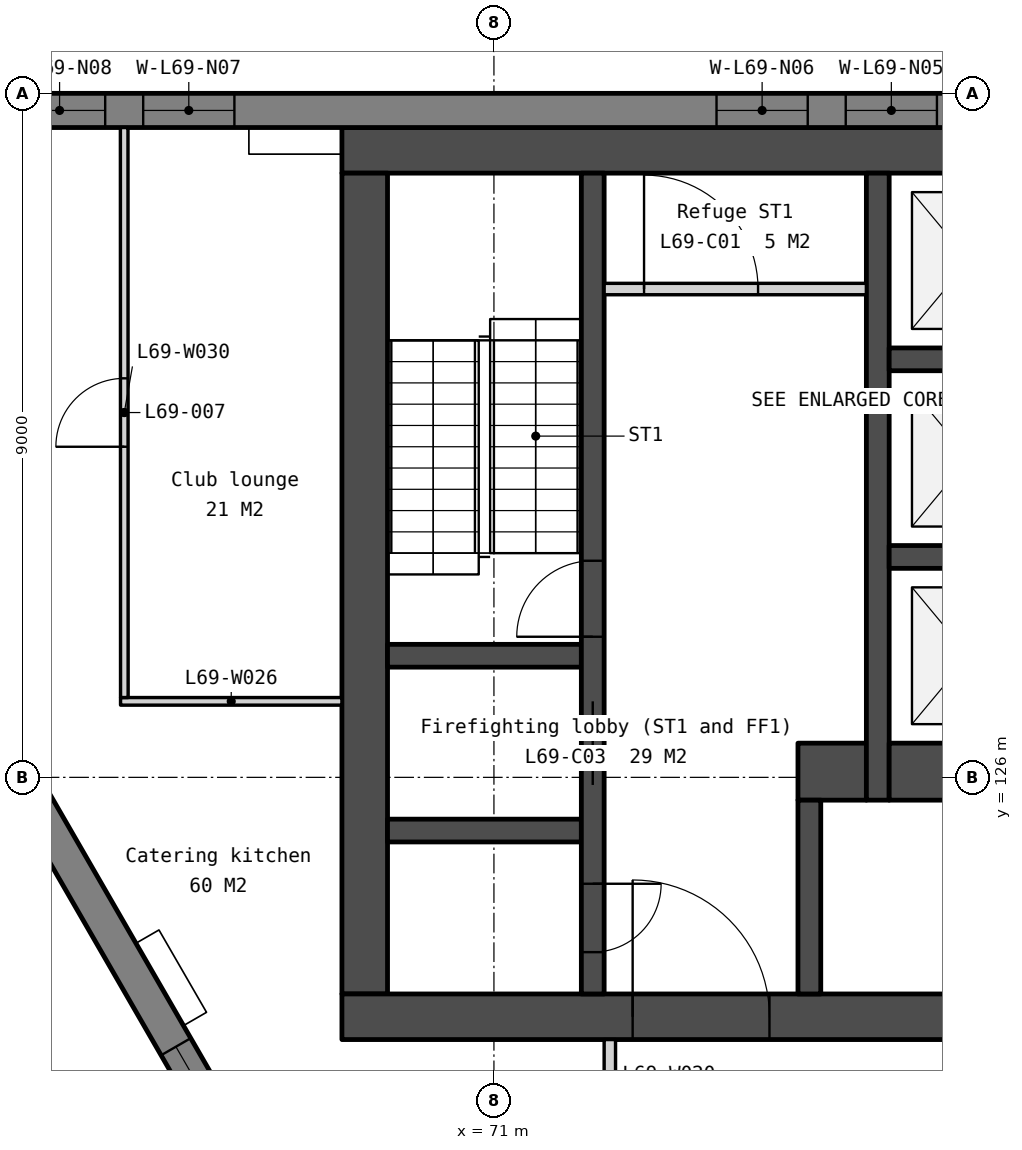
"""IFC4 building model, lengths in metres.
Left out: names, types, materials, properties, quantities, classifications, styles, units other than length and angle.
Written with IfcOpenShell. Run it as: python <this file> out.ifc"""

import sys

from ifc_helpers import new_model, si_unit, direction, frame, frame_2d, origin, place, context, subcontext, project, spatial, polyline, rectangle, outline, extrude, element, fill, save


model = new_model("IFC4")
c1 = context("Model", 3, precision=1e-05, world=origin(), true_north=direction((0.0, 1.0)))
c2 = subcontext(c1, "Body", "Model", "MODEL_VIEW")
j1 = project(units=[si_unit("LENGTHUNIT", "METRE"), si_unit("PLANEANGLEUNIT", "RADIAN")], contexts=[c1])
p1 = place(None, origin())
s1 = spatial("IfcSite", under=j1, at=p1, CompositionType="ELEMENT")
p2 = place(p1, origin())
s2 = spatial("IfcBuilding", under=s1, at=p2, CompositionType="ELEMENT")
p3 = place(p2, frame((0.0, 0.0, 281.6)))
s3 = spatial("IfcBuildingStorey", under=s2, at=p3, CompositionType="ELEMENT", Elevation=281.6)
p4 = place(p3, frame((69.0, 134.25, 0.0), z_axis=(0.0, 0.0, 1.0), x_axis=(1.0, 0.0, 0.0)))
e1 = element("IfcWall", 1, at=p4, inside=s3, PredefinedType="SOLIDWALL", context=c2, shape_type="SweptSolid", body=[
    extrude(rectangle(XDim=22.0, YDim=0.6, at=frame_2d((11.0, 0.0))), origin(), (0.0, 0.0, 1.0), 3.5),
])
p5 = place(p3, frame((69.3, 133.95, 0.0), z_axis=(0.0, 0.0, 1.0), x_axis=(0.0, -1.0, 0.0)))
e2 = element("IfcWall", 2, at=p5, inside=s3, PredefinedType="SOLIDWALL", context=c2, shape_type="SweptSolid", body=[
    extrude(rectangle(XDim=10.8, YDim=0.6, at=frame_2d((5.4, 0.0))), origin(), (0.0, 0.0, 1.0), 3.5),
])
p6 = place(p3, frame((69.0, 122.85, 0.0), z_axis=(0.0, 0.0, 1.0), x_axis=(1.0, 0.0, 0.0)))
e3 = element("IfcWall", 3, at=p6, inside=s3, PredefinedType="SOLIDWALL", context=c2, shape_type="SweptSolid", body=[
    extrude(rectangle(XDim=22.0, YDim=0.6, at=frame_2d((11.0, 0.0))), origin(), (0.0, 0.0, 1.0), 3.5),
])
p7 = place(p6, frame((16.375, 0.0, 0.0)))
e4 = element("IfcOpeningElement", 4, at=p7, cuts=e3, PredefinedType="OPENING", context=c2, shape_type="SweptSolid", body=[
    extrude(rectangle(XDim=1.8, YDim=2.1, at=frame_2d((0.9, 1.05))), frame((0.0, 0.31, 0.0), z_axis=(0.0, -1.0, 0.0), x_axis=(1.0, 0.0, 0.0)), (0.0, 0.0, 1.0), 0.62),
])
p8 = place(p6, frame((3.825, 0.0, 0.0)))
e5 = element("IfcOpeningElement", 5, at=p8, cuts=e3, PredefinedType="OPENING", context=c2, shape_type="SweptSolid", body=[
    extrude(rectangle(XDim=1.8, YDim=2.1, at=frame_2d((0.9, 1.05))), frame((0.0, 0.31, 0.0), z_axis=(0.0, -1.0, 0.0), x_axis=(1.0, 0.0, 0.0)), (0.0, 0.0, 1.0), 0.62),
])
p9 = place(p6, frame((12.85, 0.0, 0.0)))
e6 = element("IfcOpeningElement", 6, at=p9, cuts=e3, PredefinedType="OPENING", context=c2, shape_type="SweptSolid", body=[
    extrude(rectangle(XDim=1.5, YDim=2.1, at=frame_2d((0.75, 1.05))), frame((0.0, 0.31, 0.0), z_axis=(0.0, -1.0, 0.0), x_axis=(1.0, 0.0, 0.0)), (0.0, 0.0, 1.0), 0.62),
])
for number, where, z_axis, x_axis in (
    (7, (69.6, 127.6, 0.0), (0.0, 0.0, 1.0), (1.0, 0.0, 0.0)),
    (8, (69.6, 125.3, 0.0), (0.0, 0.0, 1.0), (1.0, 0.0, 0.0)),
):
    element("IfcWall", number, at=place(p3, frame(where, z_axis=z_axis, x_axis=x_axis)), inside=s3, PredefinedType="SOLIDWALL", context=c2, shape_type="SweptSolid", body=[
        extrude(rectangle(XDim=2.55, YDim=0.3, at=frame_2d((1.275, 0.0))), origin(), (0.0, 0.0, 1.0), 3.5),
    ])
p10 = place(p3, frame((72.3, 133.95, 0.0), z_axis=(0.0, 0.0, 1.0), x_axis=(0.0, -1.0, 0.0)))
e9 = element("IfcWall", 9, at=p10, inside=s3, PredefinedType="SOLIDWALL", context=c2, shape_type="SweptSolid", body=[
    extrude(rectangle(XDim=10.8, YDim=0.3, at=frame_2d((5.4, 0.0))), origin(), (0.0, 0.0, 1.0), 3.5),
])
p11 = place(p10, frame((6.95, 0.0, 0.0)))
e10 = element("IfcOpeningElement", 10, at=p11, cuts=e9, PredefinedType="OPENING", context=c2, shape_type="SweptSolid", body=[
    extrude(rectangle(XDim=1.1, YDim=2.1, at=frame_2d((0.55, 1.05))), frame((0.0, 0.16, 0.0), z_axis=(0.0, -1.0, 0.0), x_axis=(1.0, 0.0, 0.0)), (0.0, 0.0, 1.0), 0.32),
])
p12 = place(p10, frame((9.35, 0.0, 0.0)))
e11 = element("IfcOpeningElement", 11, at=p12, cuts=e9, PredefinedType="OPENING", context=c2, shape_type="SweptSolid", body=[
    extrude(rectangle(XDim=0.9, YDim=2.1, at=frame_2d((0.45, 1.05))), frame((0.0, 0.16, 0.0), z_axis=(0.0, -1.0, 0.0), x_axis=(1.0, 0.0, 0.0)), (0.0, 0.0, 1.0), 0.32),
])
p13 = place(p10, frame((5.1, 0.0, 0.0)))
e12 = element("IfcOpeningElement", 12, at=p13, cuts=e9, PredefinedType="OPENING", context=c2, shape_type="SweptSolid", body=[
    extrude(rectangle(XDim=1.0, YDim=2.1, at=frame_2d((0.5, 1.05))), frame((0.0, 0.16, 0.0), z_axis=(0.0, -1.0, 0.0), x_axis=(1.0, 0.0, 0.0)), (0.0, 0.0, 1.0), 0.32),
])
p14 = place(p3, frame((72.45, 132.425, 0.0), z_axis=(0.0, 0.0, 1.0), x_axis=(1.0, 0.0, 0.0)))
e13 = element("IfcWall", 13, at=p14, inside=s3, PredefinedType="PARTITIONING", context=c2, shape_type="SweptSolid", body=[
    extrude(rectangle(XDim=3.45, YDim=0.15, at=frame_2d((1.725, 0.0))), origin(), (0.0, 0.0, 1.0), 3.5),
])
p15 = place(p14, frame((0.525, 0.0, 0.0)))
e14 = element("IfcOpeningElement", 14, at=p15, cuts=e13, PredefinedType="OPENING", context=c2, shape_type="SweptSolid", body=[
    extrude(rectangle(XDim=1.5, YDim=2.1, at=frame_2d((0.75, 1.05))), frame((0.0, 0.085, 0.0), z_axis=(0.0, -1.0, 0.0), x_axis=(1.0, 0.0, 0.0)), (0.0, 0.0, 1.0), 0.17),
])
p16 = place(p3, frame((75.0, 126.075, 0.0), z_axis=(0.0, 0.0, 1.0), x_axis=(1.0, 0.0, 0.0)))
e15 = element("IfcWall", 15, at=p16, inside=s3, PredefinedType="SOLIDWALL", context=c2, shape_type="SweptSolid", body=[
    extrude(rectangle(XDim=0.9, YDim=0.75, at=frame_2d((0.45, 0.0))), origin(), (0.0, 0.0, 1.0), 3.5),
])
p17 = place(p3, frame((75.15, 125.7, 0.0), z_axis=(0.0, 0.0, 1.0), x_axis=(0.0, -1.0, 0.0)))
e16 = element("IfcWall", 16, at=p17, inside=s3, PredefinedType="SOLIDWALL", context=c2, shape_type="SweptSolid", body=[
    extrude(rectangle(XDim=2.55, YDim=0.3, at=frame_2d((1.275, 0.0))), origin(), (0.0, 0.0, 1.0), 3.5),
])
p18 = place(p3, frame((76.05, 133.95, 0.0), z_axis=(0.0, 0.0, 1.0), x_axis=(0.0, -1.0, 0.0)))
e17 = element("IfcWall", 17, at=p18, inside=s3, PredefinedType="SOLIDWALL", context=c2, shape_type="SweptSolid", body=[
    extrude(rectangle(XDim=8.25, YDim=0.3, at=frame_2d((4.125, 0.0))), origin(), (0.0, 0.0, 1.0), 3.5),
])
for number, where, z_axis, x_axis in (
    (18, (76.2, 131.5, 0.0), (0.0, 0.0, 1.0), (1.0, 0.0, 0.0)),
    (19, (76.2, 128.9, 0.0), (0.0, 0.0, 1.0), (1.0, 0.0, 0.0)),
):
    element("IfcWall", number, at=place(p3, frame(where, z_axis=z_axis, x_axis=x_axis)), inside=s3, PredefinedType="SOLIDWALL", context=c2, shape_type="SweptSolid", body=[
        extrude(rectangle(XDim=2.1, YDim=0.3, at=frame_2d((1.05, 0.0))), origin(), (0.0, 0.0, 1.0), 3.5),
    ])
p19 = place(p3, frame((76.2, 126.075, 0.0), z_axis=(0.0, 0.0, 1.0), x_axis=(1.0, 0.0, 0.0)))
e20 = element("IfcWall", 20, at=p19, inside=s3, PredefinedType="SOLIDWALL", context=c2, shape_type="SweptSolid", body=[
    extrude(rectangle(XDim=2.1, YDim=0.75, at=frame_2d((1.05, 0.0))), origin(), (0.0, 0.0, 1.0), 3.5),
])
p20 = place(p3, frame((98.486, 134.775, -0.15), z_axis=(0.0, 0.0, 1.0), x_axis=(-1.0, 0.0, 0.0)))
e21 = element("IfcWall", 21, at=p20, inside=s3, PredefinedType="SOLIDWALL", context=c2, shape_type="SweptSolid", body=[
    extrude(outline(polyline([(36.972, 0.0), (36.972, 3.55), (0.0, 3.55), (0.0, 0.0), (36.972, 0.0)])), frame((0.0, 0.225, 0.0), z_axis=(0.0, -1.0, 0.0), x_axis=(1.0, 0.0, 0.0)), (0.0, 0.0, 1.0), 0.45),
])
p21 = place(p20, frame((3.172, 0.0, 0.95)))
e22 = element("IfcOpeningElement", 22, at=p21, cuts=e21, PredefinedType="OPENING", context=c2, shape_type="SweptSolid", body=[
    extrude(rectangle(XDim=1.2, YDim=2.2, at=frame_2d((0.6, 1.1))), frame((0.0, 0.235, 0.0), z_axis=(0.0, -1.0, 0.0), x_axis=(1.0, 0.0, 0.0)), (0.0, 0.0, 1.0), 0.47),
])
p22 = place(p20, frame((4.872, 0.0, 0.95)))
e23 = element("IfcOpeningElement", 23, at=p22, cuts=e21, PredefinedType="OPENING", context=c2, shape_type="SweptSolid", body=[
    extrude(rectangle(XDim=1.2, YDim=2.2, at=frame_2d((0.6, 1.1))), frame((0.0, 0.235, 0.0), z_axis=(0.0, -1.0, 0.0), x_axis=(1.0, 0.0, 0.0)), (0.0, 0.0, 1.0), 0.47),
])
p23 = place(p20, frame((12.415, 0.0, 0.95)))
e24 = element("IfcOpeningElement", 24, at=p23, cuts=e21, PredefinedType="OPENING", context=c2, shape_type="SweptSolid", body=[
    extrude(rectangle(XDim=1.2, YDim=2.2, at=frame_2d((0.6, 1.1))), frame((0.0, 0.235, 0.0), z_axis=(0.0, -1.0, 0.0), x_axis=(1.0, 0.0, 0.0)), (0.0, 0.0, 1.0), 0.47),
])
p24 = place(p20, frame((14.115, 0.0, 0.95)))
e25 = element("IfcOpeningElement", 25, at=p24, cuts=e21, PredefinedType="OPENING", context=c2, shape_type="SweptSolid", body=[
    extrude(rectangle(XDim=1.2, YDim=2.2, at=frame_2d((0.6, 1.1))), frame((0.0, 0.235, 0.0), z_axis=(0.0, -1.0, 0.0), x_axis=(1.0, 0.0, 0.0)), (0.0, 0.0, 1.0), 0.47),
])
p25 = place(p20, frame((21.658, 0.0, 0.95)))
e26 = element("IfcOpeningElement", 26, at=p25, cuts=e21, PredefinedType="OPENING", context=c2, shape_type="SweptSolid", body=[
    extrude(rectangle(XDim=1.2, YDim=2.2, at=frame_2d((0.6, 1.1))), frame((0.0, 0.235, 0.0), z_axis=(0.0, -1.0, 0.0), x_axis=(1.0, 0.0, 0.0)), (0.0, 0.0, 1.0), 0.47),
])
p26 = place(p20, frame((23.358, 0.0, 0.95)))
e27 = element("IfcOpeningElement", 27, at=p26, cuts=e21, PredefinedType="OPENING", context=c2, shape_type="SweptSolid", body=[
    extrude(rectangle(XDim=1.2, YDim=2.2, at=frame_2d((0.6, 1.1))), frame((0.0, 0.235, 0.0), z_axis=(0.0, -1.0, 0.0), x_axis=(1.0, 0.0, 0.0)), (0.0, 0.0, 1.0), 0.47),
])
p27 = place(p20, frame((30.901, 0.0, 0.95)))
e28 = element("IfcOpeningElement", 28, at=p27, cuts=e21, PredefinedType="OPENING", context=c2, shape_type="SweptSolid", body=[
    extrude(rectangle(XDim=1.2, YDim=2.2, at=frame_2d((0.6, 1.1))), frame((0.0, 0.235, 0.0), z_axis=(0.0, -1.0, 0.0), x_axis=(1.0, 0.0, 0.0)), (0.0, 0.0, 1.0), 0.47),
])
p28 = place(p20, frame((32.601, 0.0, 0.95)))
e29 = element("IfcOpeningElement", 29, at=p28, cuts=e21, PredefinedType="OPENING", context=c2, shape_type="SweptSolid", body=[
    extrude(rectangle(XDim=1.2, YDim=2.2, at=frame_2d((0.6, 1.1))), frame((0.0, 0.235, 0.0), z_axis=(0.0, -1.0, 0.0), x_axis=(1.0, 0.0, 0.0)), (0.0, 0.0, 1.0), 0.47),
])
p29 = place(p3, frame((60.609, 133.207, -0.15), z_axis=(0.0, 0.0, 1.0), x_axis=(0.500002536638, -0.866023939251, 0.0)))
e30 = element("IfcWall", 30, at=p29, inside=s3, PredefinedType="SOLIDWALL", context=c2, shape_type="SweptSolid", body=[
    extrude(outline(polyline([(36.972, 0.0), (36.972, 3.55), (0.0, 3.55), (0.0, 0.0), (36.972, 0.0)])), frame((0.0, 0.225, 0.0), z_axis=(0.0, -1.0, 0.0), x_axis=(1.0, 0.0, 0.0)), (0.0, 0.0, 1.0), 0.45),
])
p30 = place(p29, frame((3.172, 0.0, 0.95)))
e31 = element("IfcOpeningElement", 31, at=p30, cuts=e30, PredefinedType="OPENING", context=c2, shape_type="SweptSolid", body=[
    extrude(rectangle(XDim=1.2, YDim=2.2, at=frame_2d((0.6, 1.1))), frame((0.0, 0.235, 0.0), z_axis=(0.0, -1.0, 0.0), x_axis=(1.0, 0.0, 0.0)), (0.0, 0.0, 1.0), 0.47),
])
p31 = place(p29, frame((4.872, 0.0, 0.95)))
e32 = element("IfcOpeningElement", 32, at=p31, cuts=e30, PredefinedType="OPENING", context=c2, shape_type="SweptSolid", body=[
    extrude(rectangle(XDim=1.2, YDim=2.2, at=frame_2d((0.6, 1.1))), frame((0.0, 0.235, 0.0), z_axis=(0.0, -1.0, 0.0), x_axis=(1.0, 0.0, 0.0)), (0.0, 0.0, 1.0), 0.47),
])
p32 = place(p29, frame((12.415, 0.0, 0.95)))
e33 = element("IfcOpeningElement", 33, at=p32, cuts=e30, PredefinedType="OPENING", context=c2, shape_type="SweptSolid", body=[
    extrude(rectangle(XDim=1.2, YDim=2.2, at=frame_2d((0.6, 1.1))), frame((0.0, 0.235, 0.0), z_axis=(0.0, -1.0, 0.0), x_axis=(1.0, 0.0, 0.0)), (0.0, 0.0, 1.0), 0.47),
])
p33 = place(p29, frame((14.115, 0.0, 0.95)))
e34 = element("IfcOpeningElement", 34, at=p33, cuts=e30, PredefinedType="OPENING", context=c2, shape_type="SweptSolid", body=[
    extrude(rectangle(XDim=1.2, YDim=2.2, at=frame_2d((0.6, 1.1))), frame((0.0, 0.235, 0.0), z_axis=(0.0, -1.0, 0.0), x_axis=(1.0, 0.0, 0.0)), (0.0, 0.0, 1.0), 0.47),
])
p34 = place(p29, frame((21.658, 0.0, 0.95)))
e35 = element("IfcOpeningElement", 35, at=p34, cuts=e30, PredefinedType="OPENING", context=c2, shape_type="SweptSolid", body=[
    extrude(rectangle(XDim=1.2, YDim=2.2, at=frame_2d((0.6, 1.1))), frame((0.0, 0.235, 0.0), z_axis=(0.0, -1.0, 0.0), x_axis=(1.0, 0.0, 0.0)), (0.0, 0.0, 1.0), 0.47),
])
p35 = place(p29, frame((23.358, 0.0, 0.95)))
e36 = element("IfcOpeningElement", 36, at=p35, cuts=e30, PredefinedType="OPENING", context=c2, shape_type="SweptSolid", body=[
    extrude(rectangle(XDim=1.2, YDim=2.2, at=frame_2d((0.6, 1.1))), frame((0.0, 0.235, 0.0), z_axis=(0.0, -1.0, 0.0), x_axis=(1.0, 0.0, 0.0)), (0.0, 0.0, 1.0), 0.47),
])
p36 = place(p29, frame((30.901, 0.0, 0.95)))
e37 = element("IfcOpeningElement", 37, at=p36, cuts=e30, PredefinedType="OPENING", context=c2, shape_type="SweptSolid", body=[
    extrude(rectangle(XDim=1.2, YDim=2.2, at=frame_2d((0.6, 1.1))), frame((0.0, 0.235, 0.0), z_axis=(0.0, -1.0, 0.0), x_axis=(1.0, 0.0, 0.0)), (0.0, 0.0, 1.0), 0.47),
])
p37 = place(p29, frame((32.601, 0.0, 0.95)))
e38 = element("IfcOpeningElement", 38, at=p37, cuts=e30, PredefinedType="OPENING", context=c2, shape_type="SweptSolid", body=[
    extrude(rectangle(XDim=1.2, YDim=2.2, at=frame_2d((0.6, 1.1))), frame((0.0, 0.235, 0.0), z_axis=(0.0, -1.0, 0.0), x_axis=(1.0, 0.0, 0.0)), (0.0, 0.0, 1.0), 0.47),
])
p38 = place(p3, frame((72.525, 120.05, 0.0), z_axis=(0.0, 0.0, 1.0), x_axis=(0.0, 1.0, 0.0)))
e39 = element("IfcWall", 39, at=p38, inside=s3, PredefinedType="PARTITIONING", context=c2, shape_type="SweptSolid", body=[
    extrude(rectangle(XDim=2.5, YDim=0.15, at=frame_2d((1.25, 0.0))), origin(), (0.0, 0.0, 1.0), 3.5),
])
p39 = place(p38, frame((0.75, 0.0, 0.0)))
e40 = element("IfcOpeningElement", 40, at=p39, cuts=e39, PredefinedType="OPENING", context=c2, shape_type="SweptSolid", body=[
    extrude(rectangle(XDim=1.0, YDim=2.1, at=frame_2d((0.5, 1.05))), frame((0.0, 0.085, 0.0), z_axis=(0.0, -1.0, 0.0), x_axis=(1.0, 0.0, 0.0)), (0.0, 0.0, 1.0), 0.17),
])
p40 = place(p3, frame((66.087, 127.0, 0.0), z_axis=(0.0, 0.0, 1.0), x_axis=(1.0, 0.0, 0.0)))
e41 = element("IfcWall", 41, at=p40, inside=s3, PredefinedType="PARTITIONING", context=c2, shape_type="SweptSolid", body=[
    extrude(rectangle(XDim=2.913, YDim=0.1, at=frame_2d((1.456, 0.0))), origin(), (0.0, 0.0, 1.0), 3.5),
])
p41 = place(p3, frame((66.137, 127.05, 0.0), z_axis=(0.0, 0.0, 1.0), x_axis=(-0.000260425135, 0.999999966089, 0.0)))
e42 = element("IfcWall", 42, at=p41, inside=s3, PredefinedType="PARTITIONING", context=c2, shape_type="SweptSolid", body=[
    extrude(rectangle(XDim=7.5, YDim=0.1, at=frame_2d((3.75, 0.0))), origin(), (0.0, 0.0, 1.0), 3.5),
])
p42 = place(p41, frame((3.3, 0.0, 0.0)))
e43 = element("IfcOpeningElement", 43, at=p42, cuts=e42, PredefinedType="OPENING", context=c2, shape_type="SweptSolid", body=[
    extrude(rectangle(XDim=0.9, YDim=2.1, at=frame_2d((0.45, 1.05))), frame((0.0, 0.06, 0.0), z_axis=(0.0, -1.0, 0.0), x_axis=(1.0, 0.0, 0.0)), (0.0, 0.0, 1.0), 0.12),
])
p43 = place(p11, origin())
e44 = element("IfcDoor", 44, at=p43, inside=s3, OperationType="SLIDING_TO_LEFT", PredefinedType="DOOR", context=c2, shape_type="SweptSolid", body=[
    extrude(rectangle(XDim=1.1, YDim=2.1, at=frame_2d((0.55, 1.05))), frame((0.0, 0.025, 0.0), z_axis=(0.0, -1.0, 0.0), x_axis=(1.0, 0.0, 0.0)), (0.0, 0.0, 1.0), 0.05),
])
fill(e10, e44)
p44 = place(p8, origin())
e45 = element("IfcDoor", 45, at=p44, inside=s3, OperationType="DOUBLE_DOOR_DOUBLE_SWING", PredefinedType="DOOR", context=c2, shape_type="SweptSolid", body=[
    extrude(rectangle(XDim=1.8, YDim=2.1, at=frame_2d((0.9, 1.05))), frame((0.0, 0.025, 0.0), z_axis=(0.0, -1.0, 0.0), x_axis=(1.0, 0.0, 0.0)), (0.0, 0.0, 1.0), 0.05),
])
fill(e5, e45)
p45 = place(p15, origin())
e46 = element("IfcDoor", 46, at=p45, inside=s3, OperationType="DOUBLE_DOOR_DOUBLE_SWING", PredefinedType="DOOR", context=c2, shape_type="SweptSolid", body=[
    extrude(rectangle(XDim=1.5, YDim=2.1, at=frame_2d((0.75, 1.05))), frame((0.0, 0.025, 0.0), z_axis=(0.0, -1.0, 0.0), x_axis=(1.0, 0.0, 0.0)), (0.0, 0.0, 1.0), 0.05),
])
fill(e14, e46)
p46 = place(p12, origin())
e47 = element("IfcDoor", 47, at=p46, inside=s3, OperationType="SINGLE_SWING_LEFT", PredefinedType="DOOR", context=c2, shape_type="SweptSolid", body=[
    extrude(rectangle(XDim=0.9, YDim=2.1, at=frame_2d((0.45, 1.05))), frame((0.0, 0.025, 0.0), z_axis=(0.0, -1.0, 0.0), x_axis=(1.0, 0.0, 0.0)), (0.0, 0.0, 1.0), 0.05),
])
fill(e11, e47)
p47 = place(p13, origin())
e48 = element("IfcDoor", 48, at=p47, inside=s3, OperationType="SINGLE_SWING_RIGHT", PredefinedType="DOOR", context=c2, shape_type="SweptSolid", body=[
    extrude(rectangle(XDim=1.0, YDim=2.1, at=frame_2d((0.5, 1.05))), frame((0.0, 0.025, 0.0), z_axis=(0.0, -1.0, 0.0), x_axis=(1.0, 0.0, 0.0)), (0.0, 0.0, 1.0), 0.05),
])
fill(e12, e48)
p48 = place(p25, origin())
e49 = element("IfcWindow", 49, at=p48, inside=s3, PartitioningType="SINGLE_PANEL", PredefinedType="WINDOW", context=c2, shape_type="SweptSolid", body=[
    extrude(rectangle(XDim=1.2, YDim=2.2, at=frame_2d((0.6, 1.1))), frame((0.0, 0.03, 0.0), z_axis=(0.0, -1.0, 0.0), x_axis=(1.0, 0.0, 0.0)), (0.0, 0.0, 1.0), 0.06),
])
fill(e26, e49)
p49 = place(p26, origin())
e50 = element("IfcWindow", 50, at=p49, inside=s3, PartitioningType="SINGLE_PANEL", PredefinedType="WINDOW", context=c2, shape_type="SweptSolid", body=[
    extrude(rectangle(XDim=1.2, YDim=2.2, at=frame_2d((0.6, 1.1))), frame((0.0, 0.03, 0.0), z_axis=(0.0, -1.0, 0.0), x_axis=(1.0, 0.0, 0.0)), (0.0, 0.0, 1.0), 0.06),
])
fill(e27, e50)
p50 = place(p27, origin())
e51 = element("IfcWindow", 51, at=p50, inside=s3, PartitioningType="SINGLE_PANEL", PredefinedType="WINDOW", context=c2, shape_type="SweptSolid", body=[
    extrude(rectangle(XDim=1.2, YDim=2.2, at=frame_2d((0.6, 1.1))), frame((0.0, 0.03, 0.0), z_axis=(0.0, -1.0, 0.0), x_axis=(1.0, 0.0, 0.0)), (0.0, 0.0, 1.0), 0.06),
])
fill(e28, e51)
p51 = place(p28, origin())
e52 = element("IfcWindow", 52, at=p51, inside=s3, PartitioningType="SINGLE_PANEL", PredefinedType="WINDOW", context=c2, shape_type="SweptSolid", body=[
    extrude(rectangle(XDim=1.2, YDim=2.2, at=frame_2d((0.6, 1.1))), frame((0.0, 0.03, 0.0), z_axis=(0.0, -1.0, 0.0), x_axis=(1.0, 0.0, 0.0)), (0.0, 0.0, 1.0), 0.06),
])
fill(e29, e52)
p52 = place(p32, origin())
e53 = element("IfcWindow", 53, at=p52, inside=s3, PartitioningType="SINGLE_PANEL", PredefinedType="WINDOW", context=c2, shape_type="SweptSolid", body=[
    extrude(rectangle(XDim=1.2, YDim=2.2, at=frame_2d((0.6, 1.1))), frame((0.0, 0.03, 0.0), z_axis=(0.0, -1.0, 0.0), x_axis=(1.0, 0.0, 0.0)), (0.0, 0.0, 1.0), 0.06),
])
fill(e33, e53)
p53 = place(p42, origin())
e54 = element("IfcDoor", 54, at=p53, inside=s3, OperationType="SINGLE_SWING_LEFT", PredefinedType="DOOR", context=c2, shape_type="SweptSolid", body=[
    extrude(rectangle(XDim=0.9, YDim=2.1, at=frame_2d((0.45, 1.05))), frame((0.0, 0.025, 0.0), z_axis=(0.0, -1.0, 0.0), x_axis=(1.0, 0.0, 0.0)), (0.0, 0.0, 1.0), 0.05),
])
fill(e43, e54)
save(model, sys.argv[1])
